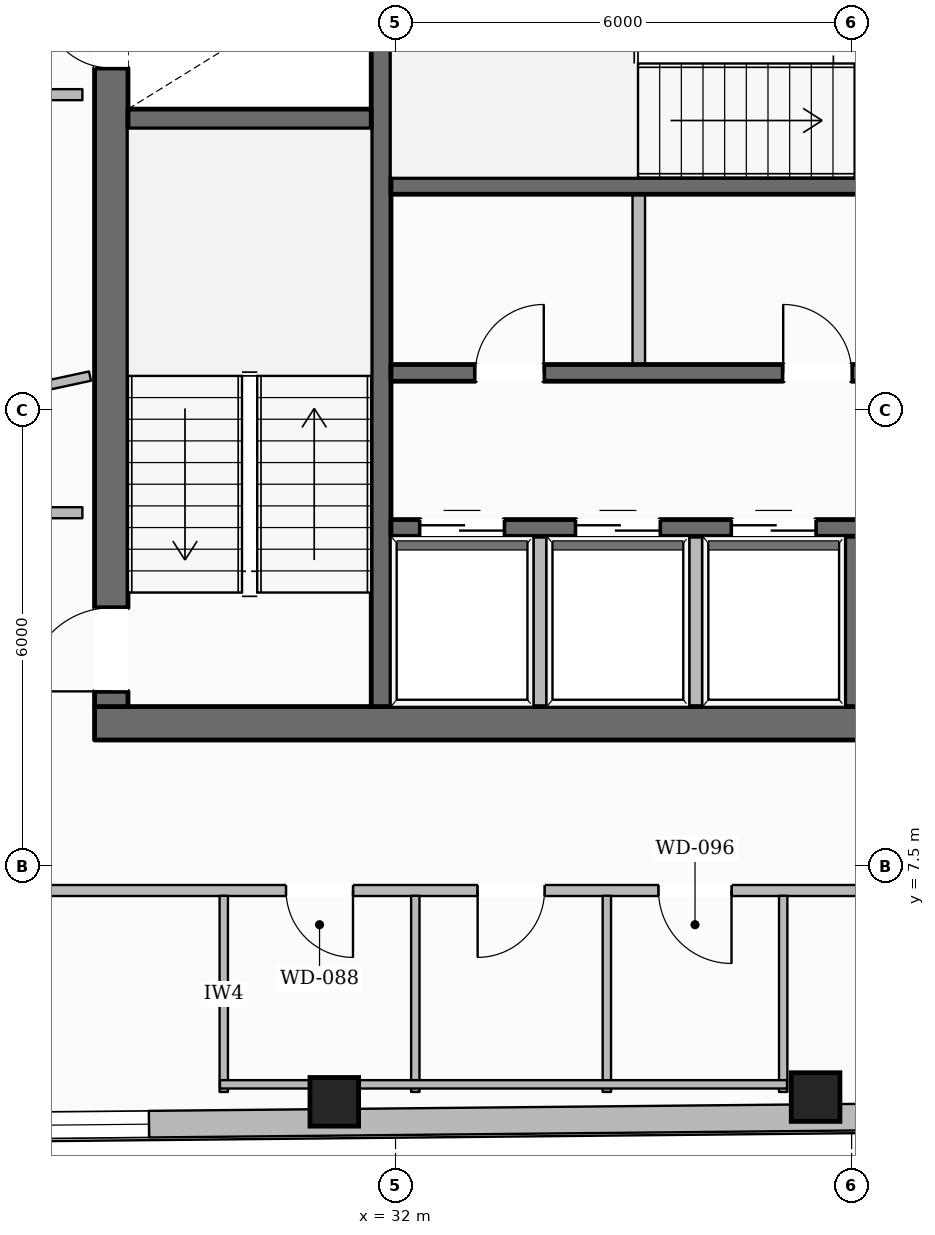
"""IFC4 building model, lengths in metres.
Left out: names, types, materials, properties, quantities, classifications, styles, units other than length and angle.
Written with IfcOpenShell. Run it as: python <this file> out.ifc"""

import sys

from ifc_helpers import new_model, si_unit, direction, frame, frame_2d, origin, origin_2d, place, context, subcontext, project, spatial, rectangle, hollow_rectangle, extrude, element, fill, save


model = new_model("IFC4")
c1 = context("Model", 3, precision=1e-05, world=origin(), true_north=direction((0.0, 1.0)))
c2 = subcontext(c1, "Body", "Model", "MODEL_VIEW")
j1 = project(units=[si_unit("LENGTHUNIT", "METRE"), si_unit("PLANEANGLEUNIT", "RADIAN")], contexts=[c1])
p1 = place(None, origin())
s1 = spatial("IfcSite", under=j1, at=p1, CompositionType="ELEMENT")
p2 = place(p1, origin())
s2 = spatial("IfcBuilding", under=s1, at=p2, CompositionType="ELEMENT")
p3 = place(p2, frame((0.0, 0.0, 218.9)))
s3 = spatial("IfcBuildingStorey", under=s2, at=p3, CompositionType="ELEMENT", Elevation=218.9)
p4 = place(p3, frame((28.04, 9.38, 0.0), z_axis=(0.0, 0.0, 1.0), x_axis=(1.0, 0.0, 0.0)))
e1 = element("IfcWall", 1, at=p4, inside=s3, PredefinedType="SOLIDWALL", context=c2, shape_type="SweptSolid", body=[
    extrude(rectangle(XDim=19.92, YDim=0.44, at=frame_2d((9.96, 0.0))), origin(), (0.0, 0.0, 1.0), 3.6),
])
p5 = place(p4, frame((10.46, 0.0, 0.0)))
e2 = element("IfcOpeningElement", 2, at=p5, cuts=e1, PredefinedType="OPENING", context=c2, shape_type="SweptSolid", body=[
    extrude(rectangle(XDim=1.4, YDim=2.2, at=frame_2d((0.7, 1.1))), frame((0.0, 0.23, 0.0), z_axis=(0.0, -1.0, 0.0), x_axis=(1.0, 0.0, 0.0)), (0.0, 0.0, 1.0), 0.46),
])
p6 = place(p3, frame((28.26, 9.6, 0.0), z_axis=(0.0, 0.0, 1.0), x_axis=(0.0, 1.0, 0.0)))
e3 = element("IfcWall", 3, at=p6, inside=s3, PredefinedType="SOLIDWALL", context=c2, shape_type="SweptSolid", body=[
    extrude(rectangle(XDim=13.0, YDim=0.44, at=frame_2d((6.5, 0.0))), origin(), (0.0, 0.0, 1.0), 3.6),
])
p7 = place(p6, frame((0.2, 0.0, 0.0)))
e4 = element("IfcOpeningElement", 4, at=p7, cuts=e3, PredefinedType="OPENING", context=c2, shape_type="SweptSolid", body=[
    extrude(rectangle(XDim=1.1, YDim=2.15, at=frame_2d((0.55, 1.075))), frame((0.0, 0.23, 0.0), z_axis=(0.0, -1.0, 0.0), x_axis=(1.0, 0.0, 0.0)), (0.0, 0.0, 1.0), 0.46),
])
p8 = place(p6, frame((8.4, 0.0, 0.0)))
e5 = element("IfcOpeningElement", 5, at=p8, cuts=e3, PredefinedType="OPENING", context=c2, shape_type="SweptSolid", body=[
    extrude(rectangle(XDim=0.9, YDim=2.1, at=frame_2d((0.45, 1.05))), frame((0.0, 0.23, 0.0), z_axis=(0.0, -1.0, 0.0), x_axis=(1.0, 0.0, 0.0)), (0.0, 0.0, 1.0), 0.46),
])
p9 = place(p3, frame((31.81, 9.6, 0.0), z_axis=(0.0, 0.0, 1.0), x_axis=(0.0, 1.0, 0.0)))
e6 = element("IfcWall", 6, at=p9, inside=s3, PredefinedType="SHEAR", context=c2, shape_type="SweptSolid", body=[
    extrude(rectangle(XDim=13.0, YDim=0.26, at=frame_2d((6.5, 0.0))), origin(), (0.0, 0.0, 1.0), 3.6),
])
p10 = place(p9, frame((10.925, 0.0, 0.0)))
e7 = element("IfcOpeningElement", 7, at=p10, cuts=e6, PredefinedType="OPENING", context=c2, shape_type="SweptSolid", body=[
    extrude(rectangle(XDim=1.25, YDim=2.25, at=frame_2d((0.625, 1.125))), frame((0.0, 0.14, 0.0), z_axis=(0.0, -1.0, 0.0), x_axis=(1.0, 0.0, 0.0)), (0.0, 0.0, 1.0), 0.28),
])
p11 = place(p3, frame((28.48, 17.33, 0.0), z_axis=(0.0, 0.0, 1.0), x_axis=(1.0, 0.0, 0.0)))
e8 = element("IfcWall", 8, at=p11, inside=s3, PredefinedType="SHEAR", context=c2, shape_type="SweptSolid", body=[
    extrude(rectangle(XDim=3.2, YDim=0.26, at=frame_2d((1.6, 0.0))), origin(), (0.0, 0.0, 1.0), 3.6),
])
p12 = place(p3, frame((31.94, 16.45, 0.0), z_axis=(0.0, 0.0, 1.0), x_axis=(1.0, 0.0, 0.0)))
e9 = element("IfcWall", 9, at=p12, inside=s3, PredefinedType="SOLIDWALL", context=c2, shape_type="SweptSolid", body=[
    extrude(rectangle(XDim=12.12, YDim=0.22, at=frame_2d((6.06, 0.0))), origin(), (0.0, 0.0, 1.0), 3.6),
])
p13 = place(p3, frame((31.94, 13.99, 0.0), z_axis=(0.0, 0.0, 1.0), x_axis=(1.0, 0.0, 0.0)))
e10 = element("IfcWall", 10, at=p13, inside=s3, PredefinedType="SOLIDWALL", context=c2, shape_type="SweptSolid", body=[
    extrude(rectangle(XDim=12.12, YDim=0.22, at=frame_2d((6.06, 0.0))), origin(), (0.0, 0.0, 1.0), 3.6),
])
p14 = place(p13, frame((1.11, 0.0, 0.0)))
e11 = element("IfcOpeningElement", 11, at=p14, cuts=e10, PredefinedType="OPENING", context=c2, shape_type="SweptSolid", body=[
    extrude(rectangle(XDim=0.9, YDim=2.1, at=frame_2d((0.45, 1.05))), frame((0.0, 0.12, 0.0), z_axis=(0.0, -1.0, 0.0), x_axis=(1.0, 0.0, 0.0)), (0.0, 0.0, 1.0), 0.24),
])
p15 = place(p13, frame((5.16, 0.0, 0.0)))
e12 = element("IfcOpeningElement", 12, at=p15, cuts=e10, PredefinedType="OPENING", context=c2, shape_type="SweptSolid", body=[
    extrude(rectangle(XDim=0.9, YDim=2.1, at=frame_2d((0.45, 1.05))), frame((0.0, 0.12, 0.0), z_axis=(0.0, -1.0, 0.0), x_axis=(1.0, 0.0, 0.0)), (0.0, 0.0, 1.0), 0.24),
])
p16 = place(p13, frame((9.61, 0.0, 0.0)))
e13 = element("IfcOpeningElement", 13, at=p16, cuts=e10, PredefinedType="OPENING", context=c2, shape_type="SweptSolid", body=[
    extrude(rectangle(XDim=0.9, YDim=2.1, at=frame_2d((0.45, 1.05))), frame((0.0, 0.12, 0.0), z_axis=(0.0, -1.0, 0.0), x_axis=(1.0, 0.0, 0.0)), (0.0, 0.0, 1.0), 0.24),
])
p17 = place(p3, frame((31.94, 11.95, 0.0), z_axis=(0.0, 0.0, 1.0), x_axis=(1.0, 0.0, 0.0)))
e14 = element("IfcWall", 14, at=p17, inside=s3, PredefinedType="SOLIDWALL", context=c2, shape_type="SweptSolid", body=[
    extrude(rectangle(XDim=6.19, YDim=0.22, at=frame_2d((3.095, 0.0))), origin(), (0.0, 0.0, 1.0), 3.6),
])
p18 = place(p17, frame((0.385, 0.0, 0.0)))
e15 = element("IfcOpeningElement", 15, at=p18, cuts=e14, PredefinedType="OPENING", context=c2, shape_type="SweptSolid", body=[
    extrude(rectangle(XDim=1.1, YDim=2.2, at=frame_2d((0.55, 1.1))), frame((0.0, 0.12, 0.0), z_axis=(0.0, -1.0, 0.0), x_axis=(1.0, 0.0, 0.0)), (0.0, 0.0, 1.0), 0.24),
])
p19 = place(p17, frame((2.435, 0.0, 0.0)))
e16 = element("IfcOpeningElement", 16, at=p19, cuts=e14, PredefinedType="OPENING", context=c2, shape_type="SweptSolid", body=[
    extrude(rectangle(XDim=1.1, YDim=2.2, at=frame_2d((0.55, 1.1))), frame((0.0, 0.12, 0.0), z_axis=(0.0, -1.0, 0.0), x_axis=(1.0, 0.0, 0.0)), (0.0, 0.0, 1.0), 0.24),
])
p20 = place(p17, frame((4.485, 0.0, 0.0)))
e17 = element("IfcOpeningElement", 17, at=p20, cuts=e14, PredefinedType="OPENING", context=c2, shape_type="SweptSolid", body=[
    extrude(rectangle(XDim=1.1, YDim=2.2, at=frame_2d((0.55, 1.1))), frame((0.0, 0.12, 0.0), z_axis=(0.0, -1.0, 0.0), x_axis=(1.0, 0.0, 0.0)), (0.0, 0.0, 1.0), 0.24),
])
p21 = place(p3, frame((38.02, 9.6, 0.0), z_axis=(0.0, 0.0, 1.0), x_axis=(0.0, 1.0, 0.0)))
e18 = element("IfcWall", 18, at=p21, inside=s3, PredefinedType="SOLIDWALL", context=c2, shape_type="SweptSolid", body=[
    extrude(rectangle(XDim=2.24, YDim=0.22, at=frame_2d((1.12, 0.0))), origin(), (0.0, 0.0, 1.0), 3.6),
])
for number, where, z_axis, x_axis in (
    (19, (31.194, 4.4, 0.0), (0.0, 0.0, 1.0), (1.0, 0.0, 0.0)),
    (20, (37.526, 4.462, 0.0), (0.0, 0.0, 1.0), (1.0, 0.0, 0.0)),
):
    element("IfcColumn", number, at=place(p3, frame(where, z_axis=z_axis, x_axis=x_axis)), inside=s3, PredefinedType="COLUMN", context=c2, shape_type="SweptSolid", body=[
        extrude(hollow_rectangle(XDim=0.64, YDim=0.64, WallThickness=0.028, at=origin_2d()), origin(), (0.0, 0.0, 1.0), 3.6),
    ])
p22 = place(p3, frame((14.171, 10.807, 0.0), z_axis=(0.0, 0.0, 1.0), x_axis=(0.504226548845, 0.86357141421, 0.0)))
e21 = element("IfcWall", 21, at=p22, inside=s3, PredefinedType="STANDARD", context=c2, shape_type="SweptSolid", body=[
    extrude(rectangle(XDim=39.276, YDim=0.35, at=frame_2d((19.638, 0.0))), origin(), (0.0, 0.0, 1.0), 3.132),
])
p23 = place(p22, frame((34.885, 0.0, 0.65)))
e22 = element("IfcOpeningElement", 22, at=p23, cuts=e21, PredefinedType="OPENING", context=c2, shape_type="SweptSolid", body=[
    extrude(rectangle(XDim=1.45, YDim=1.75, at=frame_2d((0.725, 0.875))), frame((0.0, 0.185, 0.0), z_axis=(0.0, -1.0, 0.0), x_axis=(1.0, 0.0, 0.0)), (0.0, 0.0, 1.0), 0.37),
])
p24 = place(p22, frame((28.497, 0.0, 0.65)))
e23 = element("IfcOpeningElement", 23, at=p24, cuts=e21, PredefinedType="OPENING", context=c2, shape_type="SweptSolid", body=[
    extrude(rectangle(XDim=1.45, YDim=1.75, at=frame_2d((0.725, 0.875))), frame((0.0, 0.185, 0.0), z_axis=(0.0, -1.0, 0.0), x_axis=(1.0, 0.0, 0.0)), (0.0, 0.0, 1.0), 0.37),
])
p25 = place(p22, frame((15.722, 0.0, 0.65)))
e24 = element("IfcOpeningElement", 24, at=p25, cuts=e21, PredefinedType="OPENING", context=c2, shape_type="SweptSolid", body=[
    extrude(rectangle(XDim=1.45, YDim=1.75, at=frame_2d((0.725, 0.875))), frame((0.0, 0.185, 0.0), z_axis=(0.0, -1.0, 0.0), x_axis=(1.0, 0.0, 0.0)), (0.0, 0.0, 1.0), 0.37),
])
p26 = place(p22, frame((9.334, 0.0, 0.65)))
e25 = element("IfcOpeningElement", 25, at=p26, cuts=e21, PredefinedType="OPENING", context=c2, shape_type="SweptSolid", body=[
    extrude(rectangle(XDim=1.45, YDim=1.75, at=frame_2d((0.725, 0.875))), frame((0.0, 0.185, 0.0), z_axis=(0.0, -1.0, 0.0), x_axis=(1.0, 0.0, 0.0)), (0.0, 0.0, 1.0), 0.37),
])
p27 = place(p22, frame((2.946, 0.0, 0.65)))
e26 = element("IfcOpeningElement", 26, at=p27, cuts=e21, PredefinedType="OPENING", context=c2, shape_type="SweptSolid", body=[
    extrude(rectangle(XDim=1.45, YDim=1.75, at=frame_2d((0.725, 0.875))), frame((0.0, 0.185, 0.0), z_axis=(0.0, -1.0, 0.0), x_axis=(1.0, 0.0, 0.0)), (0.0, 0.0, 1.0), 0.37),
])
p28 = place(p3, frame((56.998, 4.385, 0.0), z_axis=(0.0, 0.0, 1.0), x_axis=(-0.999951327982, -0.009866188108, 0.0)))
e27 = element("IfcWall", 27, at=p28, inside=s3, PredefinedType="STANDARD", context=c2, shape_type="SweptSolid", body=[
    extrude(rectangle(XDim=38.949, YDim=0.35, at=frame_2d((19.475, 0.0))), origin(), (0.0, 0.0, 1.0), 3.132),
])
p29 = place(p28, frame((34.576, 0.0, 0.65)))
e28 = element("IfcOpeningElement", 28, at=p29, cuts=e27, PredefinedType="OPENING", context=c2, shape_type="SweptSolid", body=[
    extrude(rectangle(XDim=1.45, YDim=1.75, at=frame_2d((0.725, 0.875))), frame((0.0, 0.185, 0.0), z_axis=(0.0, -1.0, 0.0), x_axis=(1.0, 0.0, 0.0)), (0.0, 0.0, 1.0), 0.37),
])
p30 = place(p28, frame((28.243, 0.0, 0.65)))
e29 = element("IfcOpeningElement", 29, at=p30, cuts=e27, PredefinedType="OPENING", context=c2, shape_type="SweptSolid", body=[
    extrude(rectangle(XDim=1.45, YDim=1.75, at=frame_2d((0.725, 0.875))), frame((0.0, 0.185, 0.0), z_axis=(0.0, -1.0, 0.0), x_axis=(1.0, 0.0, 0.0)), (0.0, 0.0, 1.0), 0.37),
])
p31 = place(p28, frame((15.579, 0.0, 0.65)))
e30 = element("IfcOpeningElement", 30, at=p31, cuts=e27, PredefinedType="OPENING", context=c2, shape_type="SweptSolid", body=[
    extrude(rectangle(XDim=1.45, YDim=1.75, at=frame_2d((0.725, 0.875))), frame((0.0, 0.185, 0.0), z_axis=(0.0, -1.0, 0.0), x_axis=(1.0, 0.0, 0.0)), (0.0, 0.0, 1.0), 0.37),
])
p32 = place(p28, frame((9.246, 0.0, 0.65)))
e31 = element("IfcOpeningElement", 31, at=p32, cuts=e27, PredefinedType="OPENING", context=c2, shape_type="SweptSolid", body=[
    extrude(rectangle(XDim=1.45, YDim=1.75, at=frame_2d((0.725, 0.875))), frame((0.0, 0.185, 0.0), z_axis=(0.0, -1.0, 0.0), x_axis=(1.0, 0.0, 0.0)), (0.0, 0.0, 1.0), 0.37),
])
p33 = place(p28, frame((2.914, 0.0, 0.65)))
e32 = element("IfcOpeningElement", 32, at=p33, cuts=e27, PredefinedType="OPENING", context=c2, shape_type="SweptSolid", body=[
    extrude(rectangle(XDim=1.45, YDim=1.75, at=frame_2d((0.725, 0.875))), frame((0.0, 0.185, 0.0), z_axis=(0.0, -1.0, 0.0), x_axis=(1.0, 0.0, 0.0)), (0.0, 0.0, 1.0), 0.37),
])
for number, where, z_axis, x_axis in (
    (33, (33.9, 9.52, 0.0), (0.0, 0.0, 1.0), (0.0, 1.0, 0.0)),
    (34, (35.95, 9.52, 0.0), (0.0, 0.0, 1.0), (0.0, 1.0, 0.0)),
):
    element("IfcWall", number, at=place(p3, frame(where, z_axis=z_axis, x_axis=x_axis)), inside=s3, PredefinedType="PARTITIONING", context=c2, shape_type="SweptSolid", body=[
        extrude(rectangle(XDim=2.32, YDim=0.165, at=frame_2d((1.16, 0.0))), origin(), (0.0, 0.0, 1.0), 3.6),
    ])
p34 = place(p3, frame((35.2, 14.1, 0.0), z_axis=(0.0, 0.0, 1.0), x_axis=(0.0, 1.0, 0.0)))
e35 = element("IfcWall", 35, at=p34, inside=s3, PredefinedType="PARTITIONING", context=c2, shape_type="SweptSolid", body=[
    extrude(rectangle(XDim=2.24, YDim=0.165, at=frame_2d((1.12, 0.0))), origin(), (0.0, 0.0, 1.0), 3.6),
])
p35 = place(p3, frame((27.88, 17.65, 0.0), z_axis=(0.0, 0.0, 1.0), x_axis=(-1.0, 0.0, 0.0)))
e36 = element("IfcWall", 36, at=p35, inside=s3, PredefinedType="PARTITIONING", context=c2, shape_type="SweptSolid", body=[
    extrude(rectangle(XDim=1.82, YDim=0.145, at=frame_2d((0.91, 0.0))), origin(), (0.0, 0.0, 1.0), 3.6),
])
p36 = place(p3, frame((49.94, 7.18, 0.0), z_axis=(0.0, 0.0, 1.0), x_axis=(-1.0, 0.0, 0.0)))
e37 = element("IfcWall", 37, at=p36, inside=s3, PredefinedType="PARTITIONING", context=c2, shape_type="SweptSolid", body=[
    extrude(rectangle(XDim=23.88, YDim=0.145, at=frame_2d((11.94, 0.0))), origin(), (0.0, 0.0, 1.0), 3.6),
])
p37 = place(p36, frame((18.5, 0.0, 0.0)))
e38 = element("IfcOpeningElement", 38, at=p37, cuts=e37, PredefinedType="OPENING", context=c2, shape_type="SweptSolid", body=[
    extrude(rectangle(XDim=0.88, YDim=2.1, at=frame_2d((0.44, 1.05))), frame((0.0, 0.083, 0.0), z_axis=(0.0, -1.0, 0.0), x_axis=(1.0, 0.0, 0.0)), (0.0, 0.0, 1.0), 0.165),
])
p38 = place(p36, frame((15.98, 0.0, 0.0)))
e39 = element("IfcOpeningElement", 39, at=p38, cuts=e37, PredefinedType="OPENING", context=c2, shape_type="SweptSolid", body=[
    extrude(rectangle(XDim=0.88, YDim=2.1, at=frame_2d((0.44, 1.05))), frame((0.0, 0.083, 0.0), z_axis=(0.0, -1.0, 0.0), x_axis=(1.0, 0.0, 0.0)), (0.0, 0.0, 1.0), 0.165),
])
p39 = place(p36, frame((13.52, 0.0, 0.0)))
e40 = element("IfcOpeningElement", 40, at=p39, cuts=e37, PredefinedType="OPENING", context=c2, shape_type="SweptSolid", body=[
    extrude(rectangle(XDim=0.96, YDim=2.1, at=frame_2d((0.48, 1.05))), frame((0.0, 0.083, 0.0), z_axis=(0.0, -1.0, 0.0), x_axis=(1.0, 0.0, 0.0)), (0.0, 0.0, 1.0), 0.165),
])
p40 = place(p36, frame((7.332, 0.0, 0.0)))
e41 = element("IfcOpeningElement", 41, at=p40, cuts=e37, PredefinedType="OPENING", context=c2, shape_type="SweptSolid", body=[
    extrude(rectangle(XDim=0.98, YDim=2.15, at=frame_2d((0.49, 1.075))), frame((0.0, 0.083, 0.0), z_axis=(0.0, -1.0, 0.0), x_axis=(1.0, 0.0, 0.0)), (0.0, 0.0, 1.0), 0.165),
])
p41 = place(p36, frame((0.707, 0.0, 0.0)))
e42 = element("IfcOpeningElement", 42, at=p41, cuts=e37, PredefinedType="OPENING", context=c2, shape_type="SweptSolid", body=[
    extrude(rectangle(XDim=0.98, YDim=2.15, at=frame_2d((0.49, 1.075))), frame((0.0, 0.083, 0.0), z_axis=(0.0, -1.0, 0.0), x_axis=(1.0, 0.0, 0.0)), (0.0, 0.0, 1.0), 0.165),
])
p42 = place(p3, frame((26.06, 12.15, 0.0), z_axis=(0.0, 0.0, 1.0), x_axis=(1.0, 0.0, 0.0)))
e43 = element("IfcWall", 43, at=p42, inside=s3, PredefinedType="PARTITIONING", context=c2, shape_type="SweptSolid", body=[
    extrude(rectangle(XDim=1.82, YDim=0.145, at=frame_2d((0.91, 0.0))), origin(), (0.0, 0.0, 1.0), 3.6),
])
for number, where, z_axis, x_axis in (
    (44, (29.74, 4.53, 0.0), (0.0, 0.0, 1.0), (0.0, 1.0, 0.0)),
    (45, (32.26, 4.53, 0.0), (0.0, 0.0, 1.0), (0.0, 1.0, 0.0)),
    (46, (34.78, 4.53, 0.0), (0.0, 0.0, 1.0), (0.0, 1.0, 0.0)),
    (47, (37.1, 4.53, 0.0), (0.0, 0.0, 1.0), (0.0, 1.0, 0.0)),
):
    element("IfcWall", number, at=place(p3, frame(where, z_axis=z_axis, x_axis=x_axis)), inside=s3, PredefinedType="PLUMBINGWALL", context=c2, shape_type="SweptSolid", body=[
        extrude(rectangle(XDim=2.58, YDim=0.11, at=frame_2d((1.29, 0.0))), origin(), (0.0, 0.0, 1.0), 3.6),
    ])
p43 = place(p3, frame((29.69, 4.63, 0.0), z_axis=(0.0, 0.0, 1.0), x_axis=(1.0, 0.0, 0.0)))
e48 = element("IfcWall", 48, at=p43, inside=s3, PredefinedType="PLUMBINGWALL", context=c2, shape_type="SweptSolid", body=[
    extrude(rectangle(XDim=7.46, YDim=0.11, at=frame_2d((3.73, 0.0))), origin(), (0.0, 0.0, 1.0), 3.135),
])
p44 = place(p3, frame((27.98, 13.948, 0.0), z_axis=(0.0, 0.0, 1.0), x_axis=(-0.977699064588, -0.210010807112, 0.0)))
e49 = element("IfcWall", 49, at=p44, inside=s3, PredefinedType="PARTITIONING", context=c2, shape_type="SweptSolid", body=[
    extrude(rectangle(XDim=13.325, YDim=0.125, at=frame_2d((6.662, 0.0))), origin(), (0.0, 0.0, 1.0), 3.141),
])
p45 = place(p30, origin())
e50 = element("IfcWindow", 50, at=p45, inside=s3, PartitioningType="SINGLE_PANEL", PredefinedType="WINDOW", context=c2, shape_type="SweptSolid", body=[
    extrude(rectangle(XDim=1.45, YDim=1.75, at=frame_2d((0.725, 0.875))), frame((0.0, 0.03, 0.0), z_axis=(0.0, -1.0, 0.0), x_axis=(1.0, 0.0, 0.0)), (0.0, 0.0, 1.0), 0.06),
])
fill(e29, e50)
p46 = place(p7, origin())
e51 = element("IfcDoor", 51, at=p46, inside=s3, OperationType="SINGLE_SWING_LEFT", PredefinedType="DOOR", context=c2, shape_type="SweptSolid", body=[
    extrude(rectangle(XDim=1.1, YDim=2.15, at=frame_2d((0.55, 1.075))), frame((0.0, 0.025, 0.0), z_axis=(0.0, -1.0, 0.0), x_axis=(1.0, 0.0, 0.0)), (0.0, 0.0, 1.0), 0.05),
])
fill(e4, e51)
p47 = place(p8, origin())
e52 = element("IfcDoor", 52, at=p47, inside=s3, OperationType="SINGLE_SWING_RIGHT", PredefinedType="DOOR", context=c2, shape_type="SweptSolid", body=[
    extrude(rectangle(XDim=0.9, YDim=2.1, at=frame_2d((0.45, 1.05))), frame((0.0, 0.025, 0.0), z_axis=(0.0, -1.0, 0.0), x_axis=(1.0, 0.0, 0.0)), (0.0, 0.0, 1.0), 0.05),
])
fill(e5, e52)
p48 = place(p18, origin())
e53 = element("IfcDoor", 53, at=p48, inside=s3, OperationType="DOUBLE_DOOR_SLIDING", PredefinedType="DOOR", context=c2, shape_type="SweptSolid", body=[
    extrude(rectangle(XDim=1.1, YDim=2.2, at=frame_2d((0.55, 1.1))), frame((0.0, 0.025, 0.0), z_axis=(0.0, -1.0, 0.0), x_axis=(1.0, 0.0, 0.0)), (0.0, 0.0, 1.0), 0.05),
])
fill(e15, e53)
p49 = place(p19, origin())
e54 = element("IfcDoor", 54, at=p49, inside=s3, OperationType="DOUBLE_DOOR_SLIDING", PredefinedType="DOOR", context=c2, shape_type="SweptSolid", body=[
    extrude(rectangle(XDim=1.1, YDim=2.2, at=frame_2d((0.55, 1.1))), frame((0.0, 0.025, 0.0), z_axis=(0.0, -1.0, 0.0), x_axis=(1.0, 0.0, 0.0)), (0.0, 0.0, 1.0), 0.05),
])
fill(e16, e54)
p50 = place(p20, origin())
e55 = element("IfcDoor", 55, at=p50, inside=s3, OperationType="DOUBLE_DOOR_SLIDING", PredefinedType="DOOR", context=c2, shape_type="SweptSolid", body=[
    extrude(rectangle(XDim=1.1, YDim=2.2, at=frame_2d((0.55, 1.1))), frame((0.0, 0.025, 0.0), z_axis=(0.0, -1.0, 0.0), x_axis=(1.0, 0.0, 0.0)), (0.0, 0.0, 1.0), 0.05),
])
fill(e17, e55)
p51 = place(p14, origin())
e56 = element("IfcDoor", 56, at=p51, inside=s3, OperationType="SINGLE_SWING_RIGHT", PredefinedType="DOOR", context=c2, shape_type="SweptSolid", body=[
    extrude(rectangle(XDim=0.9, YDim=2.1, at=frame_2d((0.45, 1.05))), frame((0.0, 0.025, 0.0), z_axis=(0.0, -1.0, 0.0), x_axis=(1.0, 0.0, 0.0)), (0.0, 0.0, 1.0), 0.05),
])
fill(e11, e56)
p52 = place(p15, origin())
e57 = element("IfcDoor", 57, at=p52, inside=s3, OperationType="SINGLE_SWING_LEFT", PredefinedType="DOOR", context=c2, shape_type="SweptSolid", body=[
    extrude(rectangle(XDim=0.9, YDim=2.1, at=frame_2d((0.45, 1.05))), frame((0.0, 0.025, 0.0), z_axis=(0.0, -1.0, 0.0), x_axis=(1.0, 0.0, 0.0)), (0.0, 0.0, 1.0), 0.05),
])
fill(e12, e57)
p53 = place(p37, origin())
e58 = element("IfcDoor", 58, at=p53, inside=s3, OperationType="SINGLE_SWING_LEFT", PredefinedType="DOOR", context=c2, shape_type="SweptSolid", body=[
    extrude(rectangle(XDim=0.88, YDim=2.1, at=frame_2d((0.44, 1.05))), frame((0.0, 0.025, 0.0), z_axis=(0.0, -1.0, 0.0), x_axis=(1.0, 0.0, 0.0)), (0.0, 0.0, 1.0), 0.05),
])
fill(e38, e58)
p54 = place(p38, origin())
e59 = element("IfcDoor", 59, at=p54, inside=s3, OperationType="SINGLE_SWING_RIGHT", PredefinedType="DOOR", context=c2, shape_type="SweptSolid", body=[
    extrude(rectangle(XDim=0.88, YDim=2.1, at=frame_2d((0.44, 1.05))), frame((0.0, 0.025, 0.0), z_axis=(0.0, -1.0, 0.0), x_axis=(1.0, 0.0, 0.0)), (0.0, 0.0, 1.0), 0.05),
])
fill(e39, e59)
p55 = place(p39, origin())
e60 = element("IfcDoor", 60, at=p55, inside=s3, OperationType="SINGLE_SWING_LEFT", PredefinedType="DOOR", context=c2, shape_type="SweptSolid", body=[
    extrude(rectangle(XDim=0.96, YDim=2.1, at=frame_2d((0.48, 1.05))), frame((0.0, 0.025, 0.0), z_axis=(0.0, -1.0, 0.0), x_axis=(1.0, 0.0, 0.0)), (0.0, 0.0, 1.0), 0.05),
])
fill(e40, e60)
save(model, sys.argv[1])
